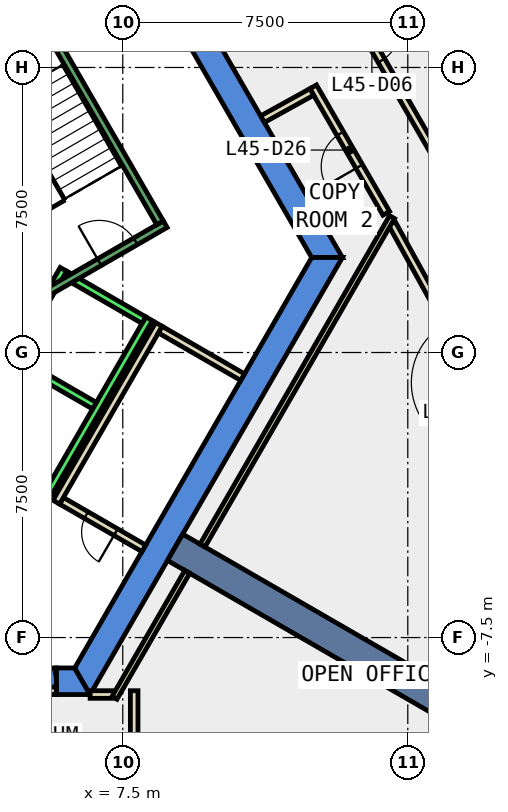
"""IFC4 building model, lengths in metres.
Left out: names, types, materials, properties, quantities, classifications, styles, units other than length and angle.
Written with IfcOpenShell. Run it as: python <this file> out.ifc"""

import sys

from ifc_helpers import new_model, si_unit, direction, frame, frame_2d, origin, place, context, subcontext, project, spatial, polyline, rectangle, outline, extrude, element, fill, save


model = new_model("IFC4")
c1 = context("Model", 3, precision=1e-05, world=origin(), true_north=direction((0.0, 1.0)))
c2 = subcontext(c1, "Body", "Model", "MODEL_VIEW")
j1 = project(units=[si_unit("LENGTHUNIT", "METRE"), si_unit("PLANEANGLEUNIT", "RADIAN")], contexts=[c1])
p1 = place(None, origin())
s1 = spatial("IfcSite", under=j1, at=p1, CompositionType="ELEMENT")
p2 = place(p1, origin())
s2 = spatial("IfcBuilding", under=s1, at=p2, CompositionType="ELEMENT")
p3 = place(p2, frame((0.0, 0.0, 202.4)))
s3 = spatial("IfcBuildingStorey", under=s2, at=p3, CompositionType="ELEMENT", Elevation=202.4)
p4 = place(p3, frame((0.0, 0.0, -0.4)))
e1 = element("IfcWall", 1, at=p4, inside=s3, PredefinedType="SHEAR", context=c2, shape_type="SweptSolid", body=[
    extrude(outline(polyline([(8.084, 11.498), (7.478, 11.148), (12.471, 2.5), (13.279, 2.5), (8.084, 11.498)])), origin(), (0.0, 0.0, 1.0), 4.2),
])
p5 = place(p3, frame((0.0, 0.0, -0.4)))
e2 = element("IfcWall", 2, at=p5, inside=s3, PredefinedType="SHEAR", context=c2, shape_type="SweptSolid", body=[
    extrude(outline(polyline([(5.75, -8.3), (5.75, -9.0), (6.64, -9.0), (6.235, -8.3), (5.75, -8.3)])), origin(), (0.0, 0.0, 1.0), 4.2),
])
p6 = place(p3, frame((0.0, 0.0, 3.6)))
e3 = element("IfcWall", 3, at=p6, inside=s3, PredefinedType="SHEAR", context=c2, shape_type="SweptSolid", body=[
    extrude(outline(polyline([(5.75, -9.0), (5.75, -8.3), (3.75, -8.3), (3.75, -9.0), (5.75, -9.0)])), origin(), (0.0, 0.0, 1.0), 0.2),
])
p7 = place(p3, frame((0.0, 0.0, -0.4)))
e4 = element("IfcWall", 4, at=p7, inside=s3, PredefinedType="SHEAR", context=c2, shape_type="SweptSolid", body=[
    extrude(outline(polyline([(6.64, -9.0), (13.279, 2.5), (12.471, 2.5), (6.235, -8.3), (6.64, -9.0)])), origin(), (0.0, 0.0, 1.0), 4.2),
])
p8 = place(p3, frame((8.877, -5.125, -0.4), z_axis=(0.0, 0.0, 1.0), x_axis=(0.866017533419, -0.500013631625, 0.0)))
e5 = element("IfcWall", 5, at=p8, inside=s3, PredefinedType="SHEAR", context=c2, shape_type="SweptSolid", body=[
    extrude(rectangle(XDim=9.0, YDim=0.8, at=frame_2d((4.5, 0.0))), origin(), (0.0, 0.0, 1.0), 4.2),
])
p9 = place(p3, frame((14.433, 3.663, 0.0), z_axis=(0.0, 0.0, 1.0), x_axis=(-0.500149526678, 0.865939057303, 0.0)))
e6 = element("IfcWall", 6, at=p9, inside=s3, PredefinedType="PARTITIONING", context=c2, shape_type="SweptSolid", body=[
    extrude(rectangle(XDim=3.843, YDim=0.2, at=frame_2d((1.921, 0.0))), origin(), (0.0, 0.0, 1.0), 3.8),
])
p10 = place(p9, frame((1.422, 0.0, 0.0)))
e7 = element("IfcOpeningElement", 7, at=p10, cuts=e6, PredefinedType="OPENING", context=c2, shape_type="SweptSolid", body=[
    extrude(rectangle(XDim=1.0, YDim=2.1, at=frame_2d((0.5, 1.05))), frame((0.0, 0.11, 0.0), z_axis=(0.0, -1.0, 0.0), x_axis=(1.0, 0.0, 0.0)), (0.0, 0.0, 1.0), 0.22),
])
p11 = place(p3, frame((12.474, 6.856, 0.0), z_axis=(0.0, 0.0, 1.0), x_axis=(-0.875305814696, -0.483569778584, 0.0)))
e8 = element("IfcWall", 8, at=p11, inside=s3, PredefinedType="PARTITIONING", context=c2, shape_type="SweptSolid", body=[
    extrude(rectangle(XDim=1.481, YDim=0.2, at=frame_2d((0.74, 0.0))), origin(), (0.0, 0.0, 1.0), 3.8),
])
p12 = place(p3, frame((18.344, -3.417, 0.0), z_axis=(0.0, 0.0, 1.0), x_axis=(-0.483555501116, 0.875313702247, 0.0)))
e9 = element("IfcWall", 9, at=p12, inside=s3, PredefinedType="PARTITIONING", context=c2, shape_type="SweptSolid", body=[
    extrude(rectangle(XDim=7.801, YDim=0.2, at=frame_2d((3.9, 0.0))), origin(), (0.0, 0.0, 1.0), 3.8),
])
p13 = place(p12, frame((3.0, 0.0, 0.0)))
e10 = element("IfcOpeningElement", 10, at=p13, cuts=e9, PredefinedType="OPENING", context=c2, shape_type="SweptSolid", body=[
    extrude(rectangle(XDim=1.8, YDim=2.1, at=frame_2d((0.9, 1.05))), frame((0.0, 0.11, 0.0), z_axis=(0.0, -1.0, 0.0), x_axis=(1.0, 0.0, 0.0)), (0.0, 0.0, 1.0), 0.22),
])
p14 = place(p3, frame((11.987, 11.698, 0.0), z_axis=(0.0, 0.0, 1.0), x_axis=(0.500075329254, -0.865981908051, 0.0)))
e11 = element("IfcWall", 11, at=p14, inside=s3, PredefinedType="PARTITIONING", context=c2, shape_type="SweptSolid", body=[
    extrude(rectangle(XDim=8.125, YDim=0.2, at=frame_2d((4.062, 0.0))), origin(), (0.0, 0.0, 1.0), 3.8),
])
p15 = place(p14, frame((3.637, 0.0, 0.0)))
e12 = element("IfcOpeningElement", 12, at=p15, cuts=e11, PredefinedType="OPENING", context=c2, shape_type="SweptSolid", body=[
    extrude(rectangle(XDim=1.0, YDim=2.1, at=frame_2d((0.5, 1.05))), frame((0.0, 0.11, 0.0), z_axis=(0.0, -1.0, 0.0), x_axis=(1.0, 0.0, 0.0)), (0.0, 0.0, 1.0), 0.22),
])
p16 = place(p3, frame((8.053, -5.152, 0.0), z_axis=(0.0, 0.0, 1.0), x_axis=(-0.866022959057, 0.500004234368, 0.0)))
e13 = element("IfcWall", 13, at=p16, inside=s3, PredefinedType="PARTITIONING", context=c2, shape_type="SweptSolid", body=[
    extrude(rectangle(XDim=2.5, YDim=0.2, at=frame_2d((1.25, 0.0))), origin(), (0.0, 0.0, 1.0), 3.8),
])
p17 = place(p16, frame((0.85, 0.0, 0.0)))
e14 = element("IfcOpeningElement", 14, at=p17, cuts=e13, PredefinedType="OPENING", context=c2, shape_type="SweptSolid", body=[
    extrude(rectangle(XDim=0.9, YDim=2.1, at=frame_2d((0.45, 1.05))), frame((0.0, 0.11, 0.0), z_axis=(0.0, -1.0, 0.0), x_axis=(1.0, 0.0, 0.0)), (0.0, 0.0, 1.0), 0.22),
])
p18 = place(p3, frame((5.751, -3.938, 0.0), z_axis=(0.0, 0.0, 1.0), x_axis=(0.500034260056, 0.866005622828, 0.0)))
e15 = element("IfcWall", 15, at=p18, inside=s3, PredefinedType="PARTITIONING", context=c2, shape_type="SweptSolid", body=[
    extrude(rectangle(XDim=5.399, YDim=0.2, at=frame_2d((2.7, 0.0))), origin(), (0.0, 0.0, 1.0), 3.8),
])
p19 = place(p3, frame((8.488, 0.602, 0.0), z_axis=(0.0, 0.0, 1.0), x_axis=(0.866022959057, -0.500004234368, 0.0)))
e16 = element("IfcWall", 16, at=p19, inside=s3, PredefinedType="PARTITIONING", context=c2, shape_type="SweptSolid", body=[
    extrude(rectangle(XDim=2.5, YDim=0.2, at=frame_2d((1.25, 0.0))), origin(), (0.0, 0.0, 1.0), 3.8),
])
p20 = place(p3, frame((6.641, -8.999, 0.0), z_axis=(0.0, 0.0, 1.0), x_axis=(1.0, 0.0, 0.0)))
e17 = element("IfcWall", 17, at=p20, inside=s3, PredefinedType="PARTITIONING", context=c2, shape_type="SweptSolid", body=[
    extrude(rectangle(XDim=0.617, YDim=0.2, at=frame_2d((0.309, 0.0))), origin(), (0.0, 0.0, 1.0), 3.8),
])
p21 = place(p3, frame((7.283, -9.086, 0.0), z_axis=(0.0, 0.0, 1.0), x_axis=(0.500035303972, 0.866005020067, 0.0)))
e18 = element("IfcWall", 18, at=p21, inside=s3, PredefinedType="PARTITIONING", context=c2, shape_type="SweptSolid", body=[
    extrude(rectangle(XDim=3.828, YDim=0.15, at=frame_2d((1.914, 0.0))), origin(), (0.0, 0.0, 1.0), 3.8),
])
p22 = place(p3, frame((7.8, -8.899, 0.0), z_axis=(0.0, 0.0, 1.0), x_axis=(0.0, -1.0, 0.0)))
e19 = element("IfcWall", 19, at=p22, inside=s3, PredefinedType="PARTITIONING", context=c2, shape_type="SweptSolid", body=[
    extrude(rectangle(XDim=5.542, YDim=0.2, at=frame_2d((2.771, 0.0))), origin(), (0.0, 0.0, 1.0), 3.8),
])
p23 = place(p3, frame((3.75, -8.9, 0.0), z_axis=(0.0, 0.0, 1.0), x_axis=(1.0, 0.0, 0.0)))
e20 = element("IfcWall", 20, at=p23, inside=s3, PredefinedType="PARTITIONING", context=c2, shape_type="SweptSolid", body=[
    extrude(rectangle(XDim=2.0, YDim=0.2, at=frame_2d((1.0, 0.0))), origin(), (0.0, 0.0, 1.0), 2.4),
])
p24 = place(p23, frame((0.19, 0.0, 0.0)))
e21 = element("IfcOpeningElement", 21, at=p24, cuts=e20, PredefinedType="OPENING", context=c2, shape_type="SweptSolid", body=[
    extrude(rectangle(XDim=1.8, YDim=2.1, at=frame_2d((0.9, 1.05))), frame((0.0, 0.11, 0.0), z_axis=(0.0, -1.0, 0.0), x_axis=(1.0, 0.0, 0.0)), (0.0, 0.0, 1.0), 0.22),
])
p25 = place(p3, frame((9.597, -5.079, 0.0), z_axis=(0.0, 0.0, 1.0), x_axis=(0.499962477963, 0.866047066059, 0.0)))
e22 = element("IfcWall", 22, at=p25, inside=s3, PredefinedType="PARTITIONING", context=c2, shape_type="SweptSolid", body=[
    extrude(rectangle(XDim=9.979, YDim=0.15, at=frame_2d((4.989, 0.0))), origin(), (0.0, 0.0, 1.0), 3.8),
])
p26 = place(p3, frame((3.24, -2.488, 0.0), z_axis=(0.0, 0.0, 1.0), x_axis=(0.500034260056, 0.866005622828, 0.0)))
e23 = element("IfcWall", 23, at=p26, inside=s3, PredefinedType="STANDARD", context=c2, shape_type="SweptSolid", body=[
    extrude(rectangle(XDim=5.399, YDim=0.2, at=frame_2d((2.7, 0.0))), origin(), (0.0, 0.0, 1.0), 3.8),
])
p27 = place(p26, frame((3.225, 0.0, 0.0)))
e24 = element("IfcOpeningElement", 24, at=p27, cuts=e23, PredefinedType="OPENING", context=c2, shape_type="SweptSolid", body=[
    extrude(rectangle(XDim=1.1, YDim=2.1, at=frame_2d((0.55, 1.05))), frame((0.0, 0.11, 0.0), z_axis=(0.0, -1.0, 0.0), x_axis=(1.0, 0.0, 0.0)), (0.0, 0.0, 1.0), 0.22),
])
p28 = place(p26, frame((1.225, 0.0, 0.0)))
e25 = element("IfcOpeningElement", 25, at=p28, cuts=e23, PredefinedType="OPENING", context=c2, shape_type="SweptSolid", body=[
    extrude(rectangle(XDim=1.1, YDim=2.1, at=frame_2d((0.55, 1.05))), frame((0.0, 0.11, 0.0), z_axis=(0.0, -1.0, 0.0), x_axis=(1.0, 0.0, 0.0)), (0.0, 0.0, 1.0), 0.22),
])
p29 = place(p3, frame((5.492, -3.788, 0.0), z_axis=(0.0, 0.0, 1.0), x_axis=(0.500034260056, 0.866005622828, 0.0)))
e26 = element("IfcWall", 26, at=p29, inside=s3, PredefinedType="STANDARD", context=c2, shape_type="SweptSolid", body=[
    extrude(rectangle(XDim=5.399, YDim=0.2, at=frame_2d((2.7, 0.0))), origin(), (0.0, 0.0, 1.0), 3.8),
])
for number, where, z_axis, x_axis in (
    (27, (4.677, -0.2, 0.0), (0.0, 0.0, 1.0), (0.866, -0.5, 0.0)),
    (28, (5.977, 2.052, 0.0), (0.0, 0.0, 1.0), (0.866, -0.5, 0.0)),
):
    element("IfcWall", number, at=place(p3, frame(where, z_axis=z_axis, x_axis=x_axis)), inside=s3, PredefinedType="STANDARD", context=c2, shape_type="SweptSolid", body=[
        extrude(rectangle(XDim=2.399, YDim=0.2, at=frame_2d((1.2, 0.0))), origin(), (0.0, 0.0, 1.0), 3.8),
    ])
p30 = place(p3, frame((4.806, 1.176, 0.0), z_axis=(0.0, 0.0, 1.0), x_axis=(0.866059941101, 0.499940174841, 0.0)))
e29 = element("IfcWall", 29, at=p30, inside=s3, PredefinedType="STANDARD", context=c2, shape_type="SweptSolid", body=[
    extrude(rectangle(XDim=4.4, YDim=0.2, at=frame_2d((2.2, 0.0))), origin(), (0.0, 0.0, 1.0), 3.8),
])
p31 = place(p30, frame((2.4, 0.0, 0.0)))
e30 = element("IfcOpeningElement", 30, at=p31, cuts=e29, PredefinedType="OPENING", context=c2, shape_type="SweptSolid", body=[
    extrude(rectangle(XDim=1.1, YDim=2.2, at=frame_2d((0.55, 1.1))), frame((0.0, 0.11, 0.0), z_axis=(0.0, -1.0, 0.0), x_axis=(1.0, 0.0, 0.0)), (0.0, 0.0, 1.0), 0.22),
])
p32 = place(p3, frame((8.48, 3.412, 0.0), z_axis=(0.0, 0.0, 1.0), x_axis=(-0.499978703459, 0.866037698999, 0.0)))
e31 = element("IfcWall", 31, at=p32, inside=s3, PredefinedType="STANDARD", context=c2, shape_type="SweptSolid", body=[
    extrude(rectangle(XDim=6.9, YDim=0.2, at=frame_2d((3.45, 0.0))), origin(), (0.0, 0.0, 1.0), 3.8),
])
p33 = place(p15, origin())
e32 = element("IfcDoor", 32, at=p33, inside=s3, OperationType="SINGLE_SWING_RIGHT", PredefinedType="DOOR", context=c2, shape_type="SweptSolid", body=[
    extrude(rectangle(XDim=1.0, YDim=2.1, at=frame_2d((0.5, 1.05))), frame((0.0, 0.025, 0.0), z_axis=(0.0, -1.0, 0.0), x_axis=(1.0, 0.0, 0.0)), (0.0, 0.0, 1.0), 0.05),
])
fill(e12, e32)
p34 = place(p10, origin())
e33 = element("IfcDoor", 33, at=p34, inside=s3, OperationType="SINGLE_SWING_RIGHT", PredefinedType="DOOR", context=c2, shape_type="SweptSolid", body=[
    extrude(rectangle(XDim=1.0, YDim=2.1, at=frame_2d((0.5, 1.05))), frame((0.0, 0.025, 0.0), z_axis=(0.0, -1.0, 0.0), x_axis=(1.0, 0.0, 0.0)), (0.0, 0.0, 1.0), 0.05),
])
fill(e7, e33)
p35 = place(p17, origin())
e34 = element("IfcDoor", 34, at=p35, inside=s3, OperationType="SINGLE_SWING_LEFT", PredefinedType="DOOR", context=c2, shape_type="SweptSolid", body=[
    extrude(rectangle(XDim=0.9, YDim=2.1, at=frame_2d((0.45, 1.05))), frame((0.0, 0.025, 0.0), z_axis=(0.0, -1.0, 0.0), x_axis=(1.0, 0.0, 0.0)), (0.0, 0.0, 1.0), 0.05),
])
fill(e14, e34)
p36 = place(p24, origin())
e35 = element("IfcDoor", 35, at=p36, inside=s3, OperationType="DOUBLE_DOOR_SINGLE_SWING", PredefinedType="DOOR", context=c2, shape_type="SweptSolid", body=[
    extrude(rectangle(XDim=1.8, YDim=2.1, at=frame_2d((0.9, 1.05))), frame((0.0, 0.025, 0.0), z_axis=(0.0, -1.0, 0.0), x_axis=(1.0, 0.0, 0.0)), (0.0, 0.0, 1.0), 0.05),
])
fill(e21, e35)
p37 = place(p31, origin())
e36 = element("IfcDoor", 36, at=p37, inside=s3, OperationType="SINGLE_SWING_LEFT", PredefinedType="DOOR", context=c2, shape_type="SweptSolid", body=[
    extrude(rectangle(XDim=1.1, YDim=2.2, at=frame_2d((0.55, 1.1))), frame((0.0, 0.025, 0.0), z_axis=(0.0, -1.0, 0.0), x_axis=(1.0, 0.0, 0.0)), (0.0, 0.0, 1.0), 0.05),
])
fill(e30, e36)
save(model, sys.argv[1])
